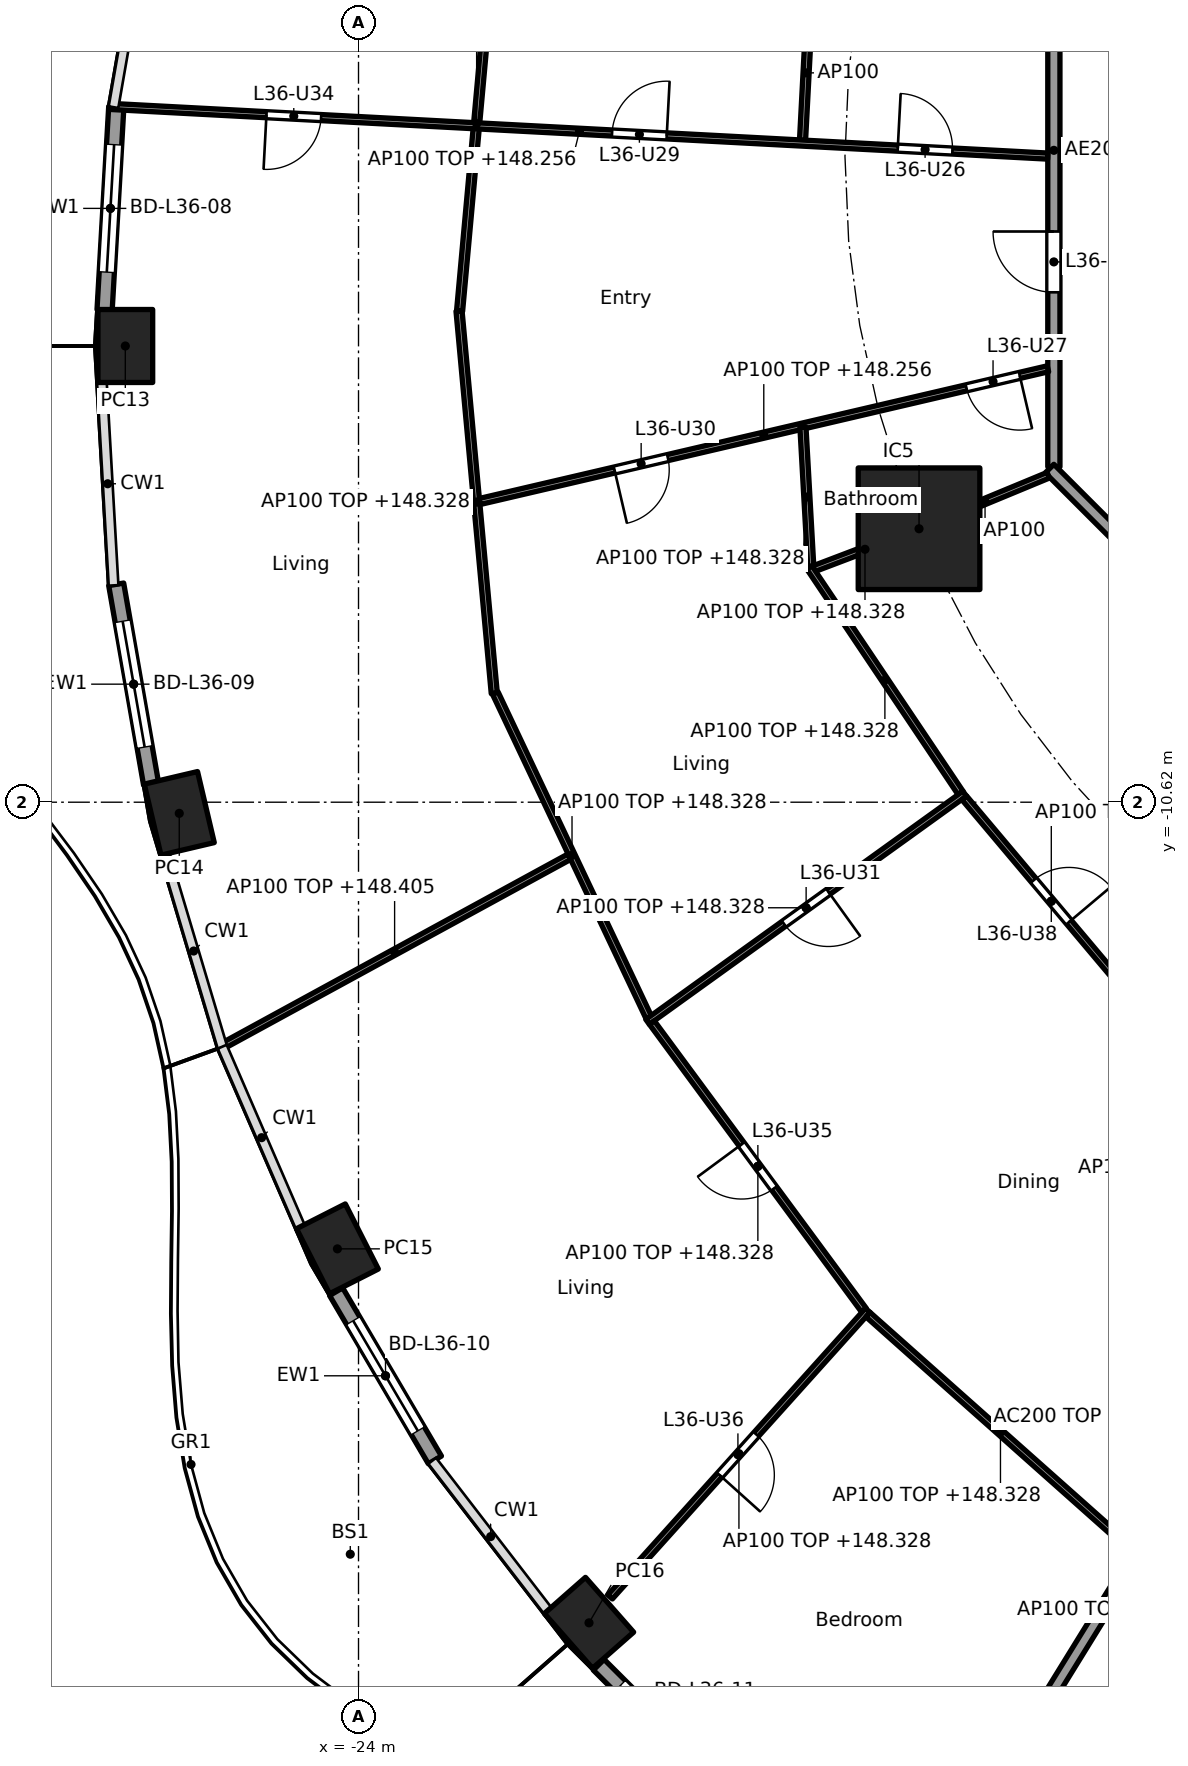
"""IFC4 building model, lengths in metres.
Left out: names, types, materials, properties, quantities, classifications, styles, units other than length and angle.
Written with IfcOpenShell. Run it as: python <this file> out.ifc"""

import sys

from ifc_helpers import new_model, si_unit, direction, frame, frame_2d, origin, origin_2d, place, context, subcontext, project, spatial, rectangle, hollow_rectangle, extrude, element, fill, save


model = new_model("IFC4")
c1 = context("Model", 3, precision=1e-05, world=origin(), true_north=direction((0.0, 1.0)))
c2 = subcontext(c1, "Body", "Model", "MODEL_VIEW")
j1 = project(units=[si_unit("LENGTHUNIT", "METRE"), si_unit("PLANEANGLEUNIT", "RADIAN")], contexts=[c1])
p1 = place(None, origin())
s1 = spatial("IfcSite", under=j1, at=p1, CompositionType="ELEMENT")
p2 = place(p1, origin())
s2 = spatial("IfcBuilding", under=s1, at=p2, CompositionType="ELEMENT")
p3 = place(p2, frame((0.0, 0.0, 145.5)))
s3 = spatial("IfcBuildingStorey", under=s2, at=p3, CompositionType="ELEMENT", Elevation=145.5)
for number, where, z_axis, x_axis in (
    (1, (-27.835, -3.118, 0.0), (0.0, 0.0, 1.0), (0.0, -1.0, 0.0)),
    (2, (-26.948, -10.803, 0.0), (0.0, 0.0, 1.0), (0.229, -0.973, 0.0)),
    (3, (-24.347, -17.965, 0.0), (0.0, 0.0, 1.0), (0.452, -0.892, 0.0)),
    (4, (-20.209, -24.115, 0.0), (0.0, 0.0, 1.0), (0.66, -0.751, 0.0)),
):
    element("IfcColumn", number, at=place(p3, frame(where, z_axis=z_axis, x_axis=x_axis)), inside=s3, PredefinedType="COLUMN", context=c2, shape_type="SweptSolid", body=[
        extrude(hollow_rectangle(XDim=1.2, YDim=0.9, WallThickness=0.04, at=origin_2d()), origin(), (0.0, 0.0, 1.0), 3.7),
    ])
p4 = place(p3, frame((-14.782, -6.123, 0.0), z_axis=(0.0, 0.0, 1.0), x_axis=(1.0, 0.0, 0.0)))
e5 = element("IfcColumn", 5, at=p4, inside=s3, PredefinedType="COLUMN", context=c2, shape_type="SweptSolid", body=[
    extrude(rectangle(XDim=2.0, YDim=2.0, at=origin_2d()), origin(), (0.0, 0.0, 1.0), 3.7),
])
p5 = place(p3, frame((-28.176, -2.526, 0.0), z_axis=(0.0, 0.0, 1.0), x_axis=(0.057537829427, 0.998343326809, 0.0)))
e6 = element("IfcWall", 6, at=p5, inside=s3, PredefinedType="SOLIDWALL", context=c2, shape_type="SweptSolid", body=[
    extrude(rectangle(XDim=3.348, YDim=0.25, at=frame_2d((1.674, 0.0))), origin(), (0.0, 0.0, 1.0), 3.44),
])
p6 = place(p5, frame((0.624, 0.0, 0.0)))
e7 = element("IfcOpeningElement", 7, at=p6, cuts=e6, PredefinedType="OPENING", context=c2, shape_type="SweptSolid", body=[
    extrude(rectangle(XDim=2.1, YDim=2.4, at=frame_2d((1.05, 1.2))), frame((0.0, 0.135, 0.0), z_axis=(0.0, -1.0, 0.0), x_axis=(1.0, 0.0, 0.0)), (0.0, 0.0, 1.0), 0.27),
])
p7 = place(p3, frame((-27.411, -10.32, 0.0), z_axis=(0.0, 0.0, 1.0), x_axis=(-0.172163521006, 0.985068384446, 0.0)))
e8 = element("IfcWall", 8, at=p7, inside=s3, PredefinedType="SOLIDWALL", context=c2, shape_type="SweptSolid", body=[
    extrude(rectangle(XDim=3.333, YDim=0.25, at=frame_2d((1.666, 0.0))), origin(), (0.0, 0.0, 1.0), 3.44),
])
p8 = place(p7, frame((0.616, 0.0, 0.0)))
e9 = element("IfcOpeningElement", 9, at=p8, cuts=e8, PredefinedType="OPENING", context=c2, shape_type="SweptSolid", body=[
    extrude(rectangle(XDim=2.1, YDim=2.4, at=frame_2d((1.05, 1.2))), frame((0.0, 0.135, 0.0), z_axis=(0.0, -1.0, 0.0), x_axis=(1.0, 0.0, 0.0)), (0.0, 0.0, 1.0), 0.27),
])
p9 = place(p3, frame((-22.744, -21.436, 0.0), z_axis=(0.0, 0.0, 1.0), x_axis=(-0.506314982873, 0.862348617508, 0.0)))
e10 = element("IfcWall", 10, at=p9, inside=s3, PredefinedType="SOLIDWALL", context=c2, shape_type="SweptSolid", body=[
    extrude(rectangle(XDim=3.208, YDim=0.25, at=frame_2d((1.604, 0.0))), origin(), (0.0, 0.0, 1.0), 3.44),
])
p10 = place(p9, frame((0.554, 0.0, 0.0)))
e11 = element("IfcOpeningElement", 11, at=p10, cuts=e10, PredefinedType="OPENING", context=c2, shape_type="SweptSolid", body=[
    extrude(rectangle(XDim=2.1, YDim=2.4, at=frame_2d((1.05, 1.2))), frame((0.0, 0.135, 0.0), z_axis=(0.0, -1.0, 0.0), x_axis=(1.0, 0.0, 0.0)), (0.0, 0.0, 1.0), 0.27),
])
p11 = place(p3, frame((-17.865, -26.985, 0.0), z_axis=(0.0, 0.0, 1.0), x_axis=(-0.707818274975, 0.706394570768, 0.0)))
e12 = element("IfcWall", 12, at=p11, inside=s3, PredefinedType="SOLIDWALL", context=c2, shape_type="SweptSolid", body=[
    extrude(rectangle(XDim=3.087, YDim=0.25, at=frame_2d((1.543, 0.0))), origin(), (0.0, 0.0, 1.0), 3.44),
])
p12 = place(p11, frame((0.493, 0.0, 0.0)))
e13 = element("IfcOpeningElement", 13, at=p12, cuts=e12, PredefinedType="OPENING", context=c2, shape_type="SweptSolid", body=[
    extrude(rectangle(XDim=2.1, YDim=2.4, at=frame_2d((1.05, 1.2))), frame((0.0, 0.135, 0.0), z_axis=(0.0, -1.0, 0.0), x_axis=(1.0, 0.0, 0.0)), (0.0, 0.0, 1.0), 0.27),
])
p13 = place(p3, frame((-6.149, -14.825, 0.0), z_axis=(0.0, 0.0, 1.0), x_axis=(-0.525406383516, -0.85085141603, 0.0)))
e14 = element("IfcWall", 14, at=p13, inside=s3, PredefinedType="PARTITIONING", context=c2, shape_type="SweptSolid", body=[
    extrude(rectangle(XDim=15.925, YDim=0.2, at=frame_2d((7.962, 0.0))), origin(), (0.0, 0.0, 1.0), 2.828),
])
p14 = place(p3, frame((-12.565, 5.304, 0.0), z_axis=(0.0, 0.0, 1.0), x_axis=(0.0, -1.0, 0.0)))
e15 = element("IfcWall", 15, at=p14, inside=s3, PredefinedType="PARTITIONING", context=c2, shape_type="SweptSolid", body=[
    extrude(rectangle(XDim=10.409, YDim=0.2, at=frame_2d((5.205, 0.0))), origin(), (0.0, 0.0, 1.0), 3.44),
])
p15 = place(p14, frame((6.539, 0.0, 0.0)))
e16 = element("IfcOpeningElement", 16, at=p15, cuts=e15, PredefinedType="OPENING", context=c2, shape_type="SweptSolid", body=[
    extrude(rectangle(XDim=1.0, YDim=2.1, at=frame_2d((0.5, 1.05))), frame((0.0, 0.11, 0.0), z_axis=(0.0, -1.0, 0.0), x_axis=(1.0, 0.0, 0.0)), (0.0, 0.0, 1.0), 0.22),
])
p16 = place(p3, frame((-12.635, -5.134, 0.0), z_axis=(0.0, 0.0, 1.0), x_axis=(0.707106781187, -0.707106781187, 0.0)))
e17 = element("IfcWall", 17, at=p16, inside=s3, PredefinedType="PARTITIONING", context=c2, shape_type="SweptSolid", body=[
    extrude(rectangle(XDim=10.609, YDim=0.2, at=frame_2d((5.305, 0.0))), origin(), (0.0, 0.0, 1.0), 3.44),
])
p17 = place(p3, frame((-16.581, 2.485, 0.0), z_axis=(0.0, 0.0, 1.0), x_axis=(-0.052455156936, -0.998623280577, 0.0)))
e18 = element("IfcWall", 18, at=p17, inside=s3, PredefinedType="PARTITIONING", context=c2, shape_type="SweptSolid", body=[
    extrude(rectangle(XDim=2.225, YDim=0.1, at=frame_2d((1.112, 0.0))), origin(), (0.0, 0.0, 1.0), 3.44),
])
p18 = place(p3, frame((-21.777, 3.621, 0.0), z_axis=(0.0, 0.0, 1.0), x_axis=(-0.090606877484, -0.995886737412, 0.0)))
e19 = element("IfcWall", 19, at=p18, inside=s3, PredefinedType="PARTITIONING", context=c2, shape_type="SweptSolid", body=[
    extrude(rectangle(XDim=6.189, YDim=0.1, at=frame_2d((3.095, 0.0))), origin(), (0.0, 0.0, 1.0), 2.828),
])
p19 = place(p3, frame((-12.665, 0.005, 0.0), z_axis=(0.0, 0.0, 1.0), x_axis=(-0.998599229025, 0.052911055468, 0.0)))
e20 = element("IfcWall", 20, at=p19, inside=s3, PredefinedType="PARTITIONING", context=c2, shape_type="SweptSolid", body=[
    extrude(rectangle(XDim=15.425, YDim=0.1, at=frame_2d((7.713, 0.0))), origin(), (0.0, 0.0, 1.0), 2.756),
])
p20 = place(p19, frame((1.571, 0.0, 0.0)))
e21 = element("IfcOpeningElement", 21, at=p20, cuts=e20, PredefinedType="OPENING", context=c2, shape_type="SweptSolid", body=[
    extrude(rectangle(XDim=0.9, YDim=2.1, at=frame_2d((0.45, 1.05))), frame((0.0, 0.06, 0.0), z_axis=(0.0, -1.0, 0.0), x_axis=(1.0, 0.0, 0.0)), (0.0, 0.0, 1.0), 0.12),
])
p21 = place(p19, frame((6.276, 0.0, 0.0)))
e22 = element("IfcOpeningElement", 22, at=p21, cuts=e20, PredefinedType="OPENING", context=c2, shape_type="SweptSolid", body=[
    extrude(rectangle(XDim=0.9, YDim=2.1, at=frame_2d((0.45, 1.05))), frame((0.0, 0.06, 0.0), z_axis=(0.0, -1.0, 0.0), x_axis=(1.0, 0.0, 0.0)), (0.0, 0.0, 1.0), 0.12),
])
p22 = place(p19, frame((11.967, 0.0, 0.0)))
e23 = element("IfcOpeningElement", 23, at=p22, cuts=e20, PredefinedType="OPENING", context=c2, shape_type="SweptSolid", body=[
    extrude(rectangle(XDim=0.9, YDim=2.1, at=frame_2d((0.45, 1.05))), frame((0.0, 0.06, 0.0), z_axis=(0.0, -1.0, 0.0), x_axis=(1.0, 0.0, 0.0)), (0.0, 0.0, 1.0), 0.12),
])
p23 = place(p3, frame((-22.347, -2.542, 0.0), z_axis=(0.0, 0.0, 1.0), x_axis=(0.091783634244, -0.995778973711, 0.0)))
e24 = element("IfcWall", 24, at=p23, inside=s3, PredefinedType="PARTITIONING", context=c2, shape_type="SweptSolid", body=[
    extrude(rectangle(XDim=6.315, YDim=0.1, at=frame_2d((3.157, 0.0))), origin(), (0.0, 0.0, 1.0), 2.828),
])
p24 = place(p3, frame((-12.662, -3.492, 0.0), z_axis=(0.0, 0.0, 1.0), x_axis=(-0.973798787998, -0.227411346448, 0.0)))
e25 = element("IfcWall", 25, at=p24, inside=s3, PredefinedType="PARTITIONING", context=c2, shape_type="SweptSolid", body=[
    extrude(rectangle(XDim=9.598, YDim=0.1, at=frame_2d((4.799, 0.0))), origin(), (0.0, 0.0, 1.0), 2.756),
])
p25 = place(p24, frame((0.477, 0.0, 0.0)))
e26 = element("IfcOpeningElement", 26, at=p25, cuts=e25, PredefinedType="OPENING", context=c2, shape_type="SweptSolid", body=[
    extrude(rectangle(XDim=0.9, YDim=2.1, at=frame_2d((0.45, 1.05))), frame((0.0, 0.06, 0.0), z_axis=(0.0, -1.0, 0.0), x_axis=(1.0, 0.0, 0.0)), (0.0, 0.0, 1.0), 0.12),
])
p26 = place(p24, frame((6.42, 0.0, 0.0)))
e27 = element("IfcOpeningElement", 27, at=p26, cuts=e25, PredefinedType="OPENING", context=c2, shape_type="SweptSolid", body=[
    extrude(rectangle(XDim=0.9, YDim=2.1, at=frame_2d((0.45, 1.05))), frame((0.0, 0.06, 0.0), z_axis=(0.0, -1.0, 0.0), x_axis=(1.0, 0.0, 0.0)), (0.0, 0.0, 1.0), 0.12),
])
p27 = place(p3, frame((-16.691, -4.454, 0.0), z_axis=(0.0, 0.0, 1.0), x_axis=(0.05596405841, -0.998432784, 0.0)))
e28 = element("IfcWall", 28, at=p27, inside=s3, PredefinedType="PARTITIONING", context=c2, shape_type="SweptSolid", body=[
    extrude(rectangle(XDim=2.299, YDim=0.1, at=frame_2d((1.149, 0.0))), origin(), (0.0, 0.0, 1.0), 2.828),
])
p28 = place(p3, frame((-12.657, -5.243, 0.0), z_axis=(0.0, 0.0, 1.0), x_axis=(-0.923864733477, -0.382719158442, 0.0)))
e29 = element("IfcWall", 29, at=p28, inside=s3, PredefinedType="PARTITIONING", context=c2, shape_type="SweptSolid", body=[
    extrude(rectangle(XDim=2.25, YDim=0.1, at=frame_2d((1.125, 0.0))), origin(), (0.0, 0.0, 1.0), 3.44),
])
p29 = place(p3, frame((-14.829, -6.141, 0.0), z_axis=(0.0, 0.0, 1.0), x_axis=(-0.934704367514, -0.355426146128, 0.0)))
e30 = element("IfcWall", 30, at=p29, inside=s3, PredefinedType="PARTITIONING", context=c2, shape_type="SweptSolid", body=[
    extrude(rectangle(XDim=1.802, YDim=0.1, at=frame_2d((0.901, 0.0))), origin(), (0.0, 0.0, 1.0), 2.828),
])
p30 = place(p3, frame((-16.587, -6.757, 0.0), z_axis=(0.0, 0.0, 1.0), x_axis=(0.55699383956, -0.830516623971, 0.0)))
e31 = element("IfcWall", 31, at=p30, inside=s3, PredefinedType="PARTITIONING", context=c2, shape_type="SweptSolid", body=[
    extrude(rectangle(XDim=4.467, YDim=0.1, at=frame_2d((2.233, 0.0))), origin(), (0.0, 0.0, 1.0), 2.828),
])
p31 = place(p3, frame((-21.75, -8.826, 0.0), z_axis=(0.0, 0.0, 1.0), x_axis=(0.427739388908, -0.903902104863, 0.0)))
e32 = element("IfcWall", 32, at=p31, inside=s3, PredefinedType="PARTITIONING", context=c2, shape_type="SweptSolid", body=[
    extrude(rectangle(XDim=5.899, YDim=0.1, at=frame_2d((2.949, 0.0))), origin(), (0.0, 0.0, 1.0), 2.828),
])
p32 = place(p3, frame((-20.533, -11.516, 0.0), z_axis=(0.0, 0.0, 1.0), x_axis=(-0.877731656478, -0.479152521872, 0.0)))
e33 = element("IfcWall", 33, at=p32, inside=s3, PredefinedType="PARTITIONING", context=c2, shape_type="SweptSolid", body=[
    extrude(rectangle(XDim=6.548, YDim=0.1, at=frame_2d((3.274, 0.0))), origin(), (0.0, 0.0, 1.0), 2.905),
])
p33 = place(p3, frame((-14.031, -10.479, 0.0), z_axis=(0.0, 0.0, 1.0), x_axis=(-0.811653955345, -0.584138559567, 0.0)))
e34 = element("IfcWall", 34, at=p33, inside=s3, PredefinedType="PARTITIONING", context=c2, shape_type="SweptSolid", body=[
    extrude(rectangle(XDim=6.426, YDim=0.1, at=frame_2d((3.213, 0.0))), origin(), (0.0, 0.0, 1.0), 2.828),
])
p34 = place(p33, frame((2.763, 0.0, 0.0)))
e35 = element("IfcOpeningElement", 35, at=p34, cuts=e34, PredefinedType="OPENING", context=c2, shape_type="SweptSolid", body=[
    extrude(rectangle(XDim=0.9, YDim=2.1, at=frame_2d((0.45, 1.05))), frame((0.0, 0.06, 0.0), z_axis=(0.0, -1.0, 0.0), x_axis=(1.0, 0.0, 0.0)), (0.0, 0.0, 1.0), 0.12),
])
p35 = place(p3, frame((-14.04, -10.547, 0.0), z_axis=(0.0, 0.0, 1.0), x_axis=(0.644036028289, -0.764995159635, 0.0)))
e36 = element("IfcWall", 36, at=p35, inside=s3, PredefinedType="PARTITIONING", context=c2, shape_type="SweptSolid", body=[
    extrude(rectangle(XDim=4.448, YDim=0.1, at=frame_2d((2.224, 0.0))), origin(), (0.0, 0.0, 1.0), 2.828),
])
p36 = place(p35, frame((1.774, 0.0, 0.0)))
e37 = element("IfcOpeningElement", 37, at=p36, cuts=e36, PredefinedType="OPENING", context=c2, shape_type="SweptSolid", body=[
    extrude(rectangle(XDim=0.9, YDim=2.1, at=frame_2d((0.45, 1.05))), frame((0.0, 0.06, 0.0), z_axis=(0.0, -1.0, 0.0), x_axis=(1.0, 0.0, 0.0)), (0.0, 0.0, 1.0), 0.12),
])
p37 = place(p3, frame((-19.176, -14.244, 0.0), z_axis=(0.0, 0.0, 1.0), x_axis=(0.593532053206, -0.80481035146, 0.0)))
e38 = element("IfcWall", 38, at=p37, inside=s3, PredefinedType="PARTITIONING", context=c2, shape_type="SweptSolid", body=[
    extrude(rectangle(XDim=5.876, YDim=0.1, at=frame_2d((2.938, 0.0))), origin(), (0.0, 0.0, 1.0), 2.828),
])
p38 = place(p37, frame((2.488, 0.0, 0.0)))
e39 = element("IfcOpeningElement", 39, at=p38, cuts=e38, PredefinedType="OPENING", context=c2, shape_type="SweptSolid", body=[
    extrude(rectangle(XDim=0.9, YDim=2.1, at=frame_2d((0.45, 1.05))), frame((0.0, 0.06, 0.0), z_axis=(0.0, -1.0, 0.0), x_axis=(1.0, 0.0, 0.0)), (0.0, 0.0, 1.0), 0.12),
])
p39 = place(p3, frame((-15.626, -18.976, 0.0), z_axis=(0.0, 0.0, 1.0), x_axis=(-0.668485690917, -0.74372500364, 0.0)))
e40 = element("IfcWall", 40, at=p39, inside=s3, PredefinedType="PARTITIONING", context=c2, shape_type="SweptSolid", body=[
    extrude(rectangle(XDim=6.337, YDim=0.1, at=frame_2d((3.168, 0.0))), origin(), (0.0, 0.0, 1.0), 2.828),
])
p40 = place(p39, frame((2.744, 0.0, 0.0)))
e41 = element("IfcOpeningElement", 41, at=p40, cuts=e40, PredefinedType="OPENING", context=c2, shape_type="SweptSolid", body=[
    extrude(rectangle(XDim=0.9, YDim=2.1, at=frame_2d((0.45, 1.05))), frame((0.0, 0.06, 0.0), z_axis=(0.0, -1.0, 0.0), x_axis=(1.0, 0.0, 0.0)), (0.0, 0.0, 1.0), 0.12),
])
p41 = place(p3, frame((-15.622, -19.046, 0.0), z_axis=(0.0, 0.0, 1.0), x_axis=(0.747342322463, -0.664439201925, 0.0)))
e42 = element("IfcWall", 42, at=p41, inside=s3, PredefinedType="PARTITIONING", context=c2, shape_type="SweptSolid", body=[
    extrude(rectangle(XDim=5.831, YDim=0.1, at=frame_2d((2.916, 0.0))), origin(), (0.0, 0.0, 1.0), 2.828),
])
p42 = place(p6, origin())
e43 = element("IfcDoor", 43, at=p42, inside=s3, OperationType="SLIDING_TO_LEFT", PredefinedType="DOOR", context=c2, shape_type="SweptSolid", body=[
    extrude(rectangle(XDim=2.1, YDim=2.4, at=frame_2d((1.05, 1.2))), frame((0.0, 0.025, 0.0), z_axis=(0.0, -1.0, 0.0), x_axis=(1.0, 0.0, 0.0)), (0.0, 0.0, 1.0), 0.05),
])
fill(e7, e43)
p43 = place(p8, origin())
e44 = element("IfcDoor", 44, at=p43, inside=s3, OperationType="SLIDING_TO_LEFT", PredefinedType="DOOR", context=c2, shape_type="SweptSolid", body=[
    extrude(rectangle(XDim=2.1, YDim=2.4, at=frame_2d((1.05, 1.2))), frame((0.0, 0.025, 0.0), z_axis=(0.0, -1.0, 0.0), x_axis=(1.0, 0.0, 0.0)), (0.0, 0.0, 1.0), 0.05),
])
fill(e9, e44)
p44 = place(p10, origin())
e45 = element("IfcDoor", 45, at=p44, inside=s3, OperationType="SLIDING_TO_LEFT", PredefinedType="DOOR", context=c2, shape_type="SweptSolid", body=[
    extrude(rectangle(XDim=2.1, YDim=2.4, at=frame_2d((1.05, 1.2))), frame((0.0, 0.025, 0.0), z_axis=(0.0, -1.0, 0.0), x_axis=(1.0, 0.0, 0.0)), (0.0, 0.0, 1.0), 0.05),
])
fill(e11, e45)
p45 = place(p12, origin())
e46 = element("IfcDoor", 46, at=p45, inside=s3, OperationType="SLIDING_TO_LEFT", PredefinedType="DOOR", context=c2, shape_type="SweptSolid", body=[
    extrude(rectangle(XDim=2.1, YDim=2.4, at=frame_2d((1.05, 1.2))), frame((0.0, 0.025, 0.0), z_axis=(0.0, -1.0, 0.0), x_axis=(1.0, 0.0, 0.0)), (0.0, 0.0, 1.0), 0.05),
])
fill(e13, e46)
p46 = place(p15, frame((1.0, 0.0, 0.0), x_axis=(-1.0, 0.0, 0.0)))
e47 = element("IfcDoor", 47, at=p46, inside=s3, OperationType="SINGLE_SWING_RIGHT", PredefinedType="DOOR", context=c2, shape_type="SweptSolid", body=[
    extrude(rectangle(XDim=1.0, YDim=2.1, at=frame_2d((0.5, 1.05))), frame((0.0, 0.025, 0.0), z_axis=(0.0, -1.0, 0.0), x_axis=(1.0, 0.0, 0.0)), (0.0, 0.0, 1.0), 0.05),
])
fill(e16, e47)
p47 = place(p20, frame((0.9, 0.0, 0.0), x_axis=(-1.0, 0.0, 0.0)))
e48 = element("IfcDoor", 48, at=p47, inside=s3, OperationType="SINGLE_SWING_LEFT", PredefinedType="DOOR", context=c2, shape_type="SweptSolid", body=[
    extrude(rectangle(XDim=0.9, YDim=2.1, at=frame_2d((0.45, 1.05))), frame((0.0, 0.025, 0.0), z_axis=(0.0, -1.0, 0.0), x_axis=(1.0, 0.0, 0.0)), (0.0, 0.0, 1.0), 0.05),
])
fill(e21, e48)
p48 = place(p25, origin())
e49 = element("IfcDoor", 49, at=p48, inside=s3, OperationType="SINGLE_SWING_LEFT", PredefinedType="DOOR", context=c2, shape_type="SweptSolid", body=[
    extrude(rectangle(XDim=0.9, YDim=2.1, at=frame_2d((0.45, 1.05))), frame((0.0, 0.025, 0.0), z_axis=(0.0, -1.0, 0.0), x_axis=(1.0, 0.0, 0.0)), (0.0, 0.0, 1.0), 0.05),
])
fill(e26, e49)
p49 = place(p21, frame((0.9, 0.0, 0.0), x_axis=(-1.0, 0.0, 0.0)))
e50 = element("IfcDoor", 50, at=p49, inside=s3, OperationType="SINGLE_SWING_RIGHT", PredefinedType="DOOR", context=c2, shape_type="SweptSolid", body=[
    extrude(rectangle(XDim=0.9, YDim=2.1, at=frame_2d((0.45, 1.05))), frame((0.0, 0.025, 0.0), z_axis=(0.0, -1.0, 0.0), x_axis=(1.0, 0.0, 0.0)), (0.0, 0.0, 1.0), 0.05),
])
fill(e22, e50)
p50 = place(p26, origin())
e51 = element("IfcDoor", 51, at=p50, inside=s3, OperationType="SINGLE_SWING_RIGHT", PredefinedType="DOOR", context=c2, shape_type="SweptSolid", body=[
    extrude(rectangle(XDim=0.9, YDim=2.1, at=frame_2d((0.45, 1.05))), frame((0.0, 0.025, 0.0), z_axis=(0.0, -1.0, 0.0), x_axis=(1.0, 0.0, 0.0)), (0.0, 0.0, 1.0), 0.05),
])
fill(e27, e51)
p51 = place(p34, origin())
e52 = element("IfcDoor", 52, at=p51, inside=s3, OperationType="SINGLE_SWING_LEFT", PredefinedType="DOOR", context=c2, shape_type="SweptSolid", body=[
    extrude(rectangle(XDim=0.9, YDim=2.1, at=frame_2d((0.45, 1.05))), frame((0.0, 0.025, 0.0), z_axis=(0.0, -1.0, 0.0), x_axis=(1.0, 0.0, 0.0)), (0.0, 0.0, 1.0), 0.05),
])
fill(e35, e52)
p52 = place(p22, origin())
e53 = element("IfcDoor", 53, at=p52, inside=s3, OperationType="SINGLE_SWING_RIGHT", PredefinedType="DOOR", context=c2, shape_type="SweptSolid", body=[
    extrude(rectangle(XDim=0.9, YDim=2.1, at=frame_2d((0.45, 1.05))), frame((0.0, 0.025, 0.0), z_axis=(0.0, -1.0, 0.0), x_axis=(1.0, 0.0, 0.0)), (0.0, 0.0, 1.0), 0.05),
])
fill(e23, e53)
p53 = place(p38, frame((0.9, 0.0, 0.0), x_axis=(-1.0, 0.0, 0.0)))
e54 = element("IfcDoor", 54, at=p53, inside=s3, OperationType="SINGLE_SWING_RIGHT", PredefinedType="DOOR", context=c2, shape_type="SweptSolid", body=[
    extrude(rectangle(XDim=0.9, YDim=2.1, at=frame_2d((0.45, 1.05))), frame((0.0, 0.025, 0.0), z_axis=(0.0, -1.0, 0.0), x_axis=(1.0, 0.0, 0.0)), (0.0, 0.0, 1.0), 0.05),
])
fill(e39, e54)
p54 = place(p40, origin())
e55 = element("IfcDoor", 55, at=p54, inside=s3, OperationType="SINGLE_SWING_RIGHT", PredefinedType="DOOR", context=c2, shape_type="SweptSolid", body=[
    extrude(rectangle(XDim=0.9, YDim=2.1, at=frame_2d((0.45, 1.05))), frame((0.0, 0.025, 0.0), z_axis=(0.0, -1.0, 0.0), x_axis=(1.0, 0.0, 0.0)), (0.0, 0.0, 1.0), 0.05),
])
fill(e41, e55)
p55 = place(p36, origin())
e56 = element("IfcDoor", 56, at=p55, inside=s3, OperationType="SINGLE_SWING_RIGHT", PredefinedType="DOOR", context=c2, shape_type="SweptSolid", body=[
    extrude(rectangle(XDim=0.9, YDim=2.1, at=frame_2d((0.45, 1.05))), frame((0.0, 0.025, 0.0), z_axis=(0.0, -1.0, 0.0), x_axis=(1.0, 0.0, 0.0)), (0.0, 0.0, 1.0), 0.05),
])
fill(e37, e56)
save(model, sys.argv[1])
